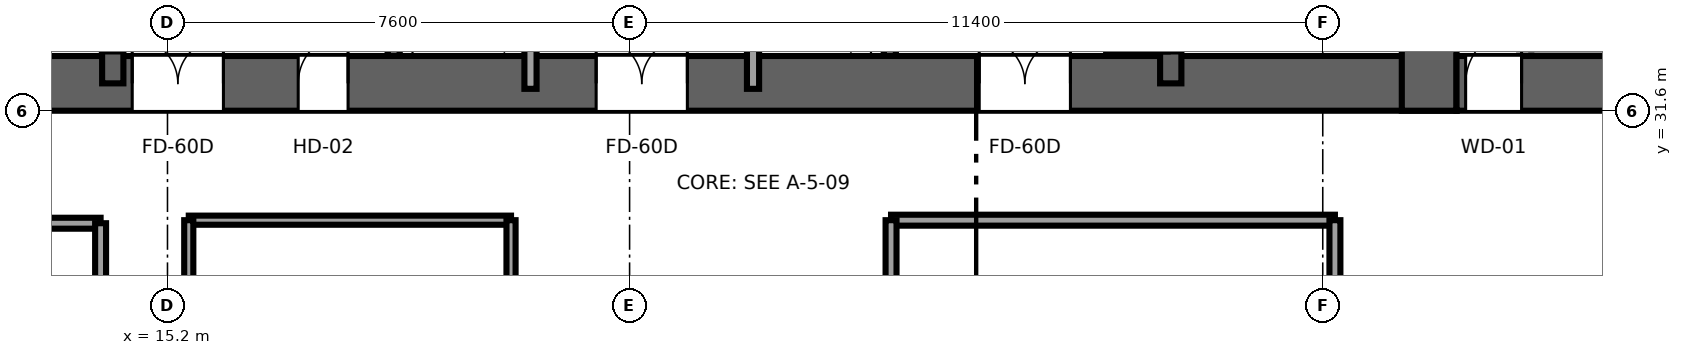
"""IFC4 building model, lengths in metres.
Left out: names, types, materials, properties, quantities, classifications, styles, units other than length and angle.
Written with IfcOpenShell. Run it as: python <this file> out.ifc"""

import sys

from ifc_helpers import new_model, si_unit, direction, frame, frame_2d, origin, place, context, subcontext, project, spatial, rectangle, extrude, source, transform, mapped, element, fill, save


model = new_model("IFC4")
c1 = context("Model", 3, precision=1e-05, world=origin(), true_north=direction((0.0, 1.0)))
c2 = subcontext(c1, "Body", "Model", "MODEL_VIEW")
j1 = project(units=[si_unit("LENGTHUNIT", "METRE"), si_unit("PLANEANGLEUNIT", "RADIAN")], contexts=[c1])
p1 = place(None, origin())
s1 = spatial("IfcSite", under=j1, at=p1, CompositionType="ELEMENT")
p2 = place(p1, origin())
s2 = spatial("IfcBuilding", under=s1, at=p2, CompositionType="ELEMENT")
p3 = place(p2, frame((0.0, 0.0, 88.8)))
s3 = spatial("IfcBuildingStorey", under=s2, at=p3, CompositionType="ELEMENT", Elevation=88.8)
p4 = place(p3, frame((9.6, 32.05, 0.0), z_axis=(0.0, 0.0, 1.0), x_axis=(1.0, 0.0, 0.0)))
e1 = element("IfcWall", 1, at=p4, inside=s3, PredefinedType="SHEAR", context=c2, shape_type="SweptSolid", body=[
    extrude(rectangle(XDim=26.8, YDim=0.9, at=frame_2d((13.4, 0.0))), origin(), (0.0, 0.0, 1.0), 3.55),
])
p5 = place(p4, frame((6.52, 0.0, 0.0), z_axis=(0.0, 0.0, 1.0), x_axis=(-1.0, 0.0, 0.0)))
e2 = element("IfcOpeningElement", 2, at=p5, cuts=e1, PredefinedType="OPENING", context=c2, shape_type="SweptSolid", body=[
    extrude(rectangle(XDim=1.5, YDim=2.04, at=frame_2d((0.75, 1.02))), frame((0.0, 0.46, 0.0), z_axis=(0.0, -1.0, 0.0), x_axis=(1.0, 0.0, 0.0)), (0.0, 0.0, 1.0), 0.92),
])
p6 = place(p4, frame((14.15, 0.0, 0.0), z_axis=(0.0, 0.0, 1.0), x_axis=(-1.0, 0.0, 0.0)))
e3 = element("IfcOpeningElement", 3, at=p6, cuts=e1, PredefinedType="OPENING", context=c2, shape_type="SweptSolid", body=[
    extrude(rectangle(XDim=1.5, YDim=2.04, at=frame_2d((0.75, 1.02))), frame((0.0, 0.46, 0.0), z_axis=(0.0, -1.0, 0.0), x_axis=(1.0, 0.0, 0.0)), (0.0, 0.0, 1.0), 0.92),
])
p7 = place(p4, frame((20.45, 0.0, 0.0), z_axis=(0.0, 0.0, 1.0), x_axis=(-1.0, 0.0, 0.0)))
e4 = element("IfcOpeningElement", 4, at=p7, cuts=e1, PredefinedType="OPENING", context=c2, shape_type="SweptSolid", body=[
    extrude(rectangle(XDim=1.5, YDim=2.04, at=frame_2d((0.75, 1.02))), frame((0.0, 0.46, 0.0), z_axis=(0.0, -1.0, 0.0), x_axis=(1.0, 0.0, 0.0)), (0.0, 0.0, 1.0), 0.92),
])
p8 = place(p4, frame((8.57, 0.0, 0.0), z_axis=(0.0, 0.0, 1.0), x_axis=(-1.0, 0.0, 0.0)))
e5 = element("IfcOpeningElement", 5, at=p8, cuts=e1, PredefinedType="OPENING", context=c2, shape_type="SweptSolid", body=[
    extrude(rectangle(XDim=0.82, YDim=2.01, at=frame_2d((0.41, 1.005))), frame((0.0, 0.46, 0.0), z_axis=(0.0, -1.0, 0.0), x_axis=(1.0, 0.0, 0.0)), (0.0, 0.0, 1.0), 0.92),
])
p9 = place(p3, frame((35.95, 31.6, 0.0), z_axis=(0.0, 0.0, 1.0), x_axis=(0.0, 1.0, 0.0)))
e6 = element("IfcWall", 6, at=p9, inside=s3, PredefinedType="SHEAR", context=c2, shape_type="SweptSolid", body=[
    extrude(rectangle(XDim=13.6, YDim=0.9, at=frame_2d((6.8, 0.0))), origin(), (0.0, 0.0, 1.0), 3.55),
])
p10 = place(p3, frame((14.3, 32.05, 0.0), z_axis=(0.0, 0.0, 1.0), x_axis=(0.0, 1.0, 0.0)))
e7 = element("IfcWall", 7, at=p10, inside=s3, PredefinedType="SHEAR", context=c2, shape_type="SweptSolid", body=[
    extrude(rectangle(XDim=12.7, YDim=0.35, at=frame_2d((6.35, 0.0))), origin(), (0.0, 0.0, 1.0), 3.55),
])
p11 = place(p10, frame((0.5, 0.0, 0.0)))
e8 = element("IfcOpeningElement", 8, at=p11, cuts=e7, PredefinedType="OPENING", context=c2, shape_type="SweptSolid", body=[
    extrude(rectangle(XDim=1.1, YDim=2.12, at=frame_2d((0.55, 1.06))), frame((0.0, 0.185, 0.0), z_axis=(0.0, -1.0, 0.0), x_axis=(1.0, 0.0, 0.0)), (0.0, 0.0, 1.0), 0.37),
])
p12 = place(p3, frame((31.7, 32.05, 0.0), z_axis=(0.0, 0.0, 1.0), x_axis=(0.0, 1.0, 0.0)))
e9 = element("IfcWall", 9, at=p12, inside=s3, PredefinedType="SHEAR", context=c2, shape_type="SweptSolid", body=[
    extrude(rectangle(XDim=12.7, YDim=0.35, at=frame_2d((6.35, 0.0))), origin(), (0.0, 0.0, 1.0), 3.55),
])
p13 = place(p12, frame((1.6, 0.0, 0.0), z_axis=(0.0, 0.0, 1.0), x_axis=(-1.0, 0.0, 0.0)))
e10 = element("IfcOpeningElement", 10, at=p13, cuts=e9, PredefinedType="OPENING", context=c2, shape_type="SweptSolid", body=[
    extrude(rectangle(XDim=1.1, YDim=2.12, at=frame_2d((0.55, 1.06))), frame((0.0, 0.185, 0.0), z_axis=(0.0, -1.0, 0.0), x_axis=(1.0, 0.0, 0.0)), (0.0, 0.0, 1.0), 0.37),
])
p14 = place(p3, frame((36.4, 32.05, 0.0), z_axis=(0.0, 0.0, 1.0), x_axis=(1.0, 0.0, 0.0)))
e11 = element("IfcWall", 11, at=p14, inside=s3, PredefinedType="SHEAR", context=c2, shape_type="SweptSolid", body=[
    extrude(rectangle(XDim=4.0, YDim=0.9, at=frame_2d((2.0, 0.0))), origin(), (0.0, 0.0, 1.0), 3.55),
])
p15 = place(p14, frame((1.07, 0.0, 0.0), z_axis=(0.0, 0.0, 1.0), x_axis=(-1.0, 0.0, 0.0)))
e12 = element("IfcOpeningElement", 12, at=p15, cuts=e11, PredefinedType="OPENING", context=c2, shape_type="SweptSolid", body=[
    extrude(rectangle(XDim=0.92, YDim=2.01, at=frame_2d((0.46, 1.005))), frame((0.0, 0.46, 0.0), z_axis=(0.0, -1.0, 0.0), x_axis=(1.0, 0.0, 0.0)), (0.0, 0.0, 1.0), 0.92),
])
for number, where, z_axis, x_axis in (
    (13, (18.92, 32.504, 0.0), (0.0, 0.0, 1.0), (0.0, 1.0, 0.0)),
    (14, (27.08, 32.504, 0.0), (0.0, 0.0, 1.0), (0.0, 1.0, 0.0)),
):
    element("IfcWall", number, at=place(p3, frame(where, z_axis=z_axis, x_axis=x_axis)), inside=s3, PredefinedType="SOLIDWALL", context=c2, shape_type="SweptSolid", body=[
        extrude(rectangle(XDim=3.646, YDim=0.2, at=frame_2d((1.823, 0.0))), origin(), (0.0, 0.0, 1.0), 3.37),
    ])
for number, where, z_axis, x_axis in (
    (15, (21.17, 31.96, 0.0), (0.0, 0.0, 1.0), (0.0, 1.0, 0.0)),
    (16, (24.83, 31.96, 0.0), (0.0, 0.0, 1.0), (0.0, 1.0, 0.0)),
):
    element("IfcWall", number, at=place(p3, frame(where, z_axis=z_axis, x_axis=x_axis)), inside=s3, PredefinedType="SOLIDWALL", context=c2, shape_type="SweptSolid", body=[
        extrude(rectangle(XDim=12.58, YDim=0.2, at=frame_2d((6.29, 0.0))), origin(), (0.0, 0.0, 1.0), 3.37),
    ])
p16 = place(p3, frame((9.88, 29.75, 0.0), z_axis=(0.0, 0.0, 1.0), x_axis=(1.0, 0.0, 0.0)))
e17 = element("IfcWall", 17, at=p16, inside=s3, PredefinedType="PARTITIONING", context=c2, shape_type="SweptSolid", body=[
    extrude(rectangle(XDim=4.22, YDim=0.18, at=frame_2d((2.11, 0.0))), origin(), (0.0, 0.0, 1.0), 3.37),
])
p17 = place(p3, frame((14.1, 20.5, 0.0), z_axis=(0.0, 0.0, 1.0), x_axis=(0.0, 1.0, 0.0)))
e18 = element("IfcWall", 18, at=p17, inside=s3, PredefinedType="PARTITIONING", context=c2, shape_type="SweptSolid", body=[
    extrude(rectangle(XDim=9.25, YDim=0.18, at=frame_2d((4.625, 0.0))), origin(), (0.0, 0.0, 1.0), 3.37),
])
p18 = place(p3, frame((27.1, 29.8, 0.0), z_axis=(0.0, 0.0, 1.0), x_axis=(1.0, 0.0, 0.0)))
e19 = element("IfcWall", 19, at=p18, inside=s3, PredefinedType="PARTITIONING", context=c2, shape_type="SweptSolid", body=[
    extrude(rectangle(XDim=7.3, YDim=0.18, at=frame_2d((3.65, 0.0))), origin(), (0.0, 0.0, 1.0), 3.37),
])
for number, where, z_axis, x_axis in (
    (20, (27.1, 20.5, 0.0), (0.0, 0.0, 1.0), (0.0, 1.0, 0.0)),
    (21, (34.4, 20.5, 0.0), (0.0, 0.0, 1.0), (0.0, 1.0, 0.0)),
):
    element("IfcWall", number, at=place(p3, frame(where, z_axis=z_axis, x_axis=x_axis)), inside=s3, PredefinedType="PARTITIONING", context=c2, shape_type="SweptSolid", body=[
        extrude(rectangle(XDim=9.3, YDim=0.18, at=frame_2d((4.65, 0.0))), origin(), (0.0, 0.0, 1.0), 3.37),
    ])
p19 = place(p3, frame((15.55, 29.8, 0.0), z_axis=(0.0, 0.0, 1.0), x_axis=(1.0, 0.0, 0.0)))
e22 = element("IfcWall", 22, at=p19, inside=s3, PredefinedType="PARTITIONING", context=c2, shape_type="SweptSolid", body=[
    extrude(rectangle(XDim=5.3, YDim=0.15, at=frame_2d((2.65, 0.0))), origin(), (0.0, 0.0, 1.0), 3.37),
])
for number, where, z_axis, x_axis in (
    (23, (15.55, 20.5, 0.0), (0.0, 0.0, 1.0), (0.0, 1.0, 0.0)),
    (24, (20.85, 20.5, 0.0), (0.0, 0.0, 1.0), (0.0, 1.0, 0.0)),
):
    element("IfcWall", number, at=place(p3, frame(where, z_axis=z_axis, x_axis=x_axis)), inside=s3, PredefinedType="PARTITIONING", context=c2, shape_type="SweptSolid", body=[
        extrude(rectangle(XDim=9.3, YDim=0.15, at=frame_2d((4.65, 0.0))), origin(), (0.0, 0.0, 1.0), 3.37),
    ])
m1 = source(origin(), c2, "Body", "SweptSolid", [
    extrude(rectangle(XDim=1.1, YDim=2.12, at=frame_2d((0.55, 1.06))), frame((0.0, 0.025, 0.0), z_axis=(0.0, -1.0, 0.0), x_axis=(1.0, 0.0, 0.0)), (0.0, 0.0, 1.0), 0.05),
])
p20 = place(p11, origin())
e25 = element("IfcDoor", 25, at=p20, inside=s3, OperationType="SINGLE_SWING_RIGHT", PredefinedType="DOOR", context=c2, shape_type="MappedRepresentation", body=[
    mapped(m1, transform((0.0, 0.0, 0.0), x_axis=(1.0, 0.0, 0.0), y_axis=(0.0, 1.0, 0.0), z_axis=(0.0, 0.0, 1.0), scale=1.0)),
])
fill(e8, e25)
p21 = place(p13, origin())
e26 = element("IfcDoor", 26, at=p21, inside=s3, OperationType="SINGLE_SWING_LEFT", PredefinedType="DOOR", context=c2, shape_type="MappedRepresentation", body=[
    mapped(m1, transform((0.0, 0.0, 0.0), x_axis=(1.0, 0.0, 0.0), y_axis=(0.0, 1.0, 0.0), z_axis=(0.0, 0.0, 1.0), scale=1.0)),
])
fill(e10, e26)
m2 = source(origin(), c2, "Body", "SweptSolid", [
    extrude(rectangle(XDim=1.5, YDim=2.04, at=frame_2d((0.75, 1.02))), frame((0.0, 0.025, 0.0), z_axis=(0.0, -1.0, 0.0), x_axis=(1.0, 0.0, 0.0)), (0.0, 0.0, 1.0), 0.05),
])
p22 = place(p5, origin())
e27 = element("IfcDoor", 27, at=p22, inside=s3, OperationType="DOUBLE_DOOR_SINGLE_SWING", PredefinedType="DOOR", context=c2, shape_type="MappedRepresentation", body=[
    mapped(m2, transform((0.0, 0.0, 0.0), x_axis=(1.0, 0.0, 0.0), y_axis=(0.0, 1.0, 0.0), z_axis=(0.0, 0.0, 1.0), scale=1.0)),
])
fill(e2, e27)
p23 = place(p6, origin())
e28 = element("IfcDoor", 28, at=p23, inside=s3, OperationType="DOUBLE_DOOR_SINGLE_SWING", PredefinedType="DOOR", context=c2, shape_type="MappedRepresentation", body=[
    mapped(m2, transform((0.0, 0.0, 0.0), x_axis=(1.0, 0.0, 0.0), y_axis=(0.0, 1.0, 0.0), z_axis=(0.0, 0.0, 1.0), scale=1.0)),
])
fill(e3, e28)
p24 = place(p7, origin())
e29 = element("IfcDoor", 29, at=p24, inside=s3, OperationType="DOUBLE_DOOR_SINGLE_SWING", PredefinedType="DOOR", context=c2, shape_type="MappedRepresentation", body=[
    mapped(m2, transform((0.0, 0.0, 0.0), x_axis=(1.0, 0.0, 0.0), y_axis=(0.0, 1.0, 0.0), z_axis=(0.0, 0.0, 1.0), scale=1.0)),
])
fill(e4, e29)
m3 = source(origin(), c2, "Body", "SweptSolid", [
    extrude(rectangle(XDim=0.82, YDim=2.01, at=frame_2d((0.41, 1.005))), frame((0.0, 0.025, 0.0), z_axis=(0.0, -1.0, 0.0), x_axis=(1.0, 0.0, 0.0)), (0.0, 0.0, 1.0), 0.05),
])
p25 = place(p8, origin())
e30 = element("IfcDoor", 30, at=p25, inside=s3, OperationType="SINGLE_SWING_RIGHT", PredefinedType="DOOR", context=c2, shape_type="MappedRepresentation", body=[
    mapped(m3, transform((0.0, 0.0, 0.0), x_axis=(1.0, 0.0, 0.0), y_axis=(0.0, 1.0, 0.0), z_axis=(0.0, 0.0, 1.0), scale=1.0)),
])
fill(e5, e30)
m4 = source(origin(), c2, "Body", "SweptSolid", [
    extrude(rectangle(XDim=0.92, YDim=2.01, at=frame_2d((0.46, 1.005))), frame((0.0, 0.025, 0.0), z_axis=(0.0, -1.0, 0.0), x_axis=(1.0, 0.0, 0.0)), (0.0, 0.0, 1.0), 0.05),
])
p26 = place(p15, origin())
e31 = element("IfcDoor", 31, at=p26, inside=s3, OperationType="SINGLE_SWING_RIGHT", PredefinedType="DOOR", context=c2, shape_type="MappedRepresentation", body=[
    mapped(m4, transform((0.0, 0.0, 0.0), x_axis=(1.0, 0.0, 0.0), y_axis=(0.0, 1.0, 0.0), z_axis=(0.0, 0.0, 1.0), scale=1.0)),
])
fill(e12, e31)
save(model, sys.argv[1])
